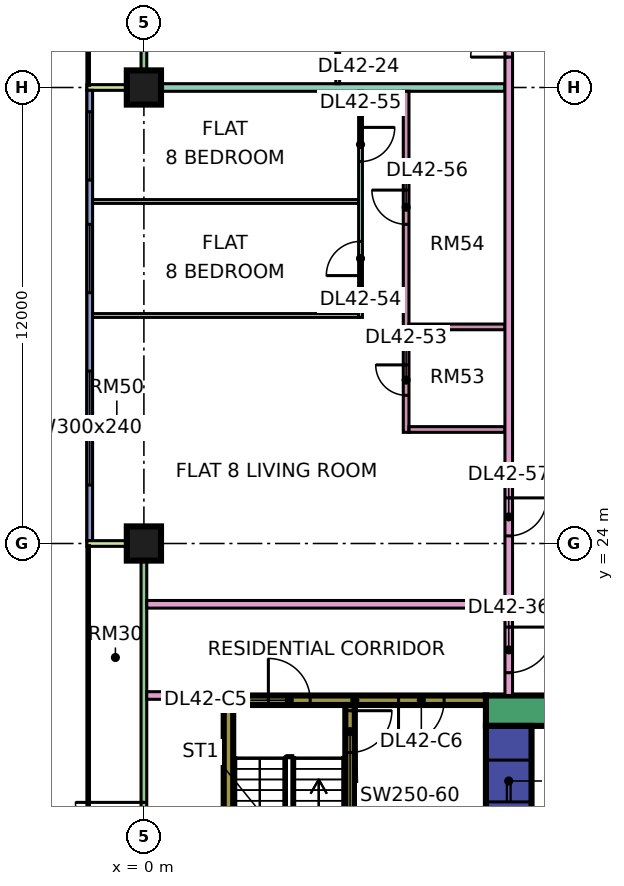
"""IFC4 building model, lengths in metres.
Left out: names, types, materials, properties, quantities, classifications, styles, units other than length and angle.
Written with IfcOpenShell. Run it as: python <this file> out.ifc"""

import sys

from ifc_helpers import new_model, si_unit, direction, frame, frame_2d, origin, origin_2d, place, context, subcontext, project, spatial, rectangle, extrude, element, fill, save


model = new_model("IFC4")
c1 = context("Model", 3, precision=1e-05, world=origin(), true_north=direction((0.0, 1.0)))
c2 = subcontext(c1, "Body", "Model", "MODEL_VIEW")
j1 = project(units=[si_unit("LENGTHUNIT", "METRE"), si_unit("PLANEANGLEUNIT", "RADIAN")], contexts=[c1])
p1 = place(None, origin())
s1 = spatial("IfcSite", under=j1, at=p1, CompositionType="ELEMENT")
p2 = place(p1, origin())
s2 = spatial("IfcBuilding", under=s1, at=p2, CompositionType="ELEMENT")
p3 = place(p2, frame((0.0, 0.0, 183.65)))
s3 = spatial("IfcBuildingStorey", under=s2, at=p3, CompositionType="ELEMENT", Elevation=183.65)
p4 = place(p3, frame((0.0, 24.0, 0.0), z_axis=(0.0, 0.0, 1.0), x_axis=(1.0, 0.0, 0.0)))
e1 = element("IfcColumn", 1, at=p4, inside=s3, PredefinedType="COLUMN", context=c2, shape_type="SweptSolid", body=[
    extrude(rectangle(XDim=0.9, YDim=0.9, at=origin_2d()), origin(), (0.0, 0.0, 1.0), 3.75),
])
p5 = place(p3, frame((0.0, 36.0, 0.0), z_axis=(0.0, 0.0, 1.0), x_axis=(1.0, 0.0, 0.0)))
e2 = element("IfcColumn", 2, at=p5, inside=s3, PredefinedType="COLUMN", context=c2, shape_type="SweptSolid", body=[
    extrude(rectangle(XDim=0.9, YDim=0.9, at=origin_2d()), origin(), (0.0, 0.0, 1.0), 3.75),
])
p6 = place(p3, frame((9.0, 19.6, 0.0), z_axis=(0.0, 0.0, 1.0), x_axis=(1.0, 0.0, 0.0)))
e3 = element("IfcWall", 3, at=p6, inside=s3, PredefinedType="SHEAR", context=c2, shape_type="SweptSolid", body=[
    extrude(rectangle(XDim=25.0, YDim=0.8, at=frame_2d((12.5, 0.0))), origin(), (0.0, 0.0, 1.0), 3.75),
])
p7 = place(p6, frame((19.1, 0.0, 0.0)))
e4 = element("IfcOpeningElement", 4, at=p7, cuts=e3, PredefinedType="OPENING", context=c2, shape_type="SweptSolid", body=[
    extrude(rectangle(XDim=1.8, YDim=2.4, at=frame_2d((0.9, 1.2))), frame((0.0, 0.41, 0.0), z_axis=(0.0, -1.0, 0.0), x_axis=(1.0, 0.0, 0.0)), (0.0, 0.0, 1.0), 0.82),
])
p8 = place(p3, frame((9.6, 7.8, 0.0), z_axis=(0.0, 0.0, 1.0), x_axis=(0.0, 1.0, 0.0)))
e5 = element("IfcWall", 5, at=p8, inside=s3, PredefinedType="SHEAR", context=c2, shape_type="SweptSolid", body=[
    extrude(rectangle(XDim=11.4, YDim=1.2, at=frame_2d((5.7, 0.0))), origin(), (0.0, 0.0, 1.0), 3.75),
])
p9 = place(p8, frame((4.075, 0.0, 0.0)))
e6 = element("IfcOpeningElement", 6, at=p9, cuts=e5, PredefinedType="OPENING", context=c2, shape_type="SweptSolid", body=[
    extrude(rectangle(XDim=1.1, YDim=2.2, at=frame_2d((0.55, 1.1))), frame((0.0, 0.61, 0.0), z_axis=(0.0, -1.0, 0.0), x_axis=(1.0, 0.0, 0.0)), (0.0, 0.0, 1.0), 1.22),
])
p10 = place(p8, frame((6.575, 0.0, 0.0)))
e7 = element("IfcOpeningElement", 7, at=p10, cuts=e5, PredefinedType="OPENING", context=c2, shape_type="SweptSolid", body=[
    extrude(rectangle(XDim=1.1, YDim=2.2, at=frame_2d((0.55, 1.1))), frame((0.0, 0.61, 0.0), z_axis=(0.0, -1.0, 0.0), x_axis=(1.0, 0.0, 0.0)), (0.0, 0.0, 1.0), 1.22),
])
p11 = place(p8, frame((9.4, 0.0, 0.0)))
e8 = element("IfcOpeningElement", 8, at=p11, cuts=e5, PredefinedType="OPENING", context=c2, shape_type="SweptSolid", body=[
    extrude(rectangle(XDim=1.1, YDim=2.2, at=frame_2d((0.55, 1.1))), frame((0.0, 0.61, 0.0), z_axis=(0.0, -1.0, 0.0), x_axis=(1.0, 0.0, 0.0)), (0.0, 0.0, 1.0), 1.22),
])
p12 = place(p8, frame((1.75, 0.0, 0.0)))
e9 = element("IfcOpeningElement", 9, at=p12, cuts=e5, PredefinedType="OPENING", context=c2, shape_type="SweptSolid", body=[
    extrude(rectangle(XDim=0.9, YDim=2.1, at=frame_2d((0.45, 1.05))), frame((0.0, 0.61, 0.0), z_axis=(0.0, -1.0, 0.0), x_axis=(1.0, 0.0, 0.0)), (0.0, 0.0, 1.0), 1.22),
])
p13 = place(p3, frame((2.1, 19.875, 0.0), z_axis=(0.0, 0.0, 1.0), x_axis=(1.0, 0.0, 0.0)))
e10 = element("IfcWall", 10, at=p13, inside=s3, PredefinedType="SHEAR", context=c2, shape_type="SweptSolid", body=[
    extrude(rectangle(XDim=6.9, YDim=0.25, at=frame_2d((3.45, 0.0))), origin(), (0.0, 0.0, 1.0), 3.75),
])
p14 = place(p13, frame((1.175, 0.0, 0.0)))
e11 = element("IfcOpeningElement", 11, at=p14, cuts=e10, PredefinedType="OPENING", context=c2, shape_type="SweptSolid", body=[
    extrude(rectangle(XDim=1.1, YDim=2.2, at=frame_2d((0.55, 1.1))), frame((0.0, 0.135, 0.0), z_axis=(0.0, -1.0, 0.0), x_axis=(1.0, 0.0, 0.0)), (0.0, 0.0, 1.0), 0.27),
])
p15 = place(p13, frame((4.6, 0.0, 0.0)))
e12 = element("IfcOpeningElement", 12, at=p15, cuts=e10, PredefinedType="OPENING", context=c2, shape_type="SweptSolid", body=[
    extrude(rectangle(XDim=1.2, YDim=2.2, at=frame_2d((0.6, 1.1))), frame((0.0, 0.135, 0.0), z_axis=(0.0, -1.0, 0.0), x_axis=(1.0, 0.0, 0.0)), (0.0, 0.0, 1.0), 0.27),
])
p16 = place(p3, frame((2.225, 13.25, 0.0), z_axis=(0.0, 0.0, 1.0), x_axis=(0.0, 1.0, 0.0)))
e13 = element("IfcWall", 13, at=p16, inside=s3, PredefinedType="SHEAR", context=c2, shape_type="SweptSolid", body=[
    extrude(rectangle(XDim=6.5, YDim=0.25, at=frame_2d((3.25, 0.0))), origin(), (0.0, 0.0, 1.0), 3.75),
])
p17 = place(p3, frame((5.425, 13.25, 0.0), z_axis=(0.0, 0.0, 1.0), x_axis=(0.0, 1.0, 0.0)))
e14 = element("IfcWall", 14, at=p17, inside=s3, PredefinedType="SHEAR", context=c2, shape_type="SweptSolid", body=[
    extrude(rectangle(XDim=6.5, YDim=0.25, at=frame_2d((3.25, 0.0))), origin(), (0.0, 0.0, 1.0), 3.75),
])
p18 = place(p17, frame((5.25, 0.0, 0.0)))
e15 = element("IfcOpeningElement", 15, at=p18, cuts=e14, PredefinedType="OPENING", context=c2, shape_type="SweptSolid", body=[
    extrude(rectangle(XDim=1.1, YDim=2.2, at=frame_2d((0.55, 1.1))), frame((0.0, 0.135, 0.0), z_axis=(0.0, -1.0, 0.0), x_axis=(1.0, 0.0, 0.0)), (0.0, 0.0, 1.0), 0.27),
])
p19 = place(p3, frame((0.0, 47.925, 0.0), z_axis=(0.0, 0.0, 1.0), x_axis=(0.0, -1.0, 0.0)))
e16 = element("IfcWall", 16, at=p19, inside=s3, PredefinedType="SOLIDWALL", context=c2, shape_type="SweptSolid", body=[
    extrude(rectangle(XDim=11.85, YDim=0.15, at=frame_2d((5.925, 0.0))), origin(), (0.0, 0.0, 1.0), 3.35),
])
p20 = place(p19, frame((0.587, 0.0, 0.45)))
e17 = element("IfcOpeningElement", 17, at=p20, cuts=e16, PredefinedType="OPENING", context=c2, shape_type="SweptSolid", body=[
    extrude(rectangle(XDim=1.2, YDim=2.4, at=frame_2d((0.6, 1.2))), frame((0.0, 0.085, 0.0), z_axis=(0.0, -1.0, 0.0), x_axis=(1.0, 0.0, 0.0)), (0.0, 0.0, 1.0), 0.17),
])
p21 = place(p19, frame((5.3, 0.0, 0.0)))
e18 = element("IfcOpeningElement", 18, at=p21, cuts=e16, PredefinedType="OPENING", context=c2, shape_type="SweptSolid", body=[
    extrude(rectangle(XDim=1.8, YDim=2.4, at=frame_2d((0.9, 1.2))), frame((0.0, 0.085, 0.0), z_axis=(0.0, -1.0, 0.0), x_axis=(1.0, 0.0, 0.0)), (0.0, 0.0, 1.0), 0.17),
])
p22 = place(p19, frame((9.55, 0.0, 0.45)))
e19 = element("IfcOpeningElement", 19, at=p22, cuts=e16, PredefinedType="OPENING", context=c2, shape_type="SweptSolid", body=[
    extrude(rectangle(XDim=1.2, YDim=2.4, at=frame_2d((0.6, 1.2))), frame((0.0, 0.085, 0.0), z_axis=(0.0, -1.0, 0.0), x_axis=(1.0, 0.0, 0.0)), (0.0, 0.0, 1.0), 0.17),
])
p23 = place(p3, frame((-1.5, 36.0, 0.0), z_axis=(0.0, 0.0, 1.0), x_axis=(1.0, 0.0, 0.0)))
e20 = element("IfcWall", 20, at=p23, inside=s3, PredefinedType="SOLIDWALL", context=c2, shape_type="SweptSolid", body=[
    extrude(rectangle(XDim=1.5, YDim=0.15, at=frame_2d((0.75, 0.0))), origin(), (0.0, 0.0, 1.0), 3.35),
])
p24 = place(p3, frame((-1.425, 35.925, 0.0), z_axis=(0.0, 0.0, 1.0), x_axis=(0.0, -1.0, 0.0)))
e21 = element("IfcWall", 21, at=p24, inside=s3, PredefinedType="SOLIDWALL", context=c2, shape_type="SweptSolid", body=[
    extrude(rectangle(XDim=11.85, YDim=0.15, at=frame_2d((5.925, 0.0))), origin(), (0.0, 0.0, 1.0), 3.35),
])
p25 = place(p24, frame((0.562, 0.0, 0.45)))
e22 = element("IfcOpeningElement", 22, at=p25, cuts=e21, PredefinedType="OPENING", context=c2, shape_type="SweptSolid", body=[
    extrude(rectangle(XDim=1.8, YDim=2.4, at=frame_2d((0.9, 1.2))), frame((0.0, 0.085, 0.0), z_axis=(0.0, -1.0, 0.0), x_axis=(1.0, 0.0, 0.0)), (0.0, 0.0, 1.0), 0.17),
])
p26 = place(p24, frame((3.525, 0.0, 0.45)))
e23 = element("IfcOpeningElement", 23, at=p26, cuts=e21, PredefinedType="OPENING", context=c2, shape_type="SweptSolid", body=[
    extrude(rectangle(XDim=1.8, YDim=2.4, at=frame_2d((0.9, 1.2))), frame((0.0, 0.085, 0.0), z_axis=(0.0, -1.0, 0.0), x_axis=(1.0, 0.0, 0.0)), (0.0, 0.0, 1.0), 0.17),
])
p27 = place(p24, frame((7.387, 0.0, 0.45)))
e24 = element("IfcOpeningElement", 24, at=p27, cuts=e21, PredefinedType="OPENING", context=c2, shape_type="SweptSolid", body=[
    extrude(rectangle(XDim=3.0, YDim=2.4, at=frame_2d((1.5, 1.2))), frame((0.0, 0.085, 0.0), z_axis=(0.0, -1.0, 0.0), x_axis=(1.0, 0.0, 0.0)), (0.0, 0.0, 1.0), 0.17),
])
p28 = place(p3, frame((0.0, 23.925, 0.0), z_axis=(0.0, 0.0, 1.0), x_axis=(0.0, -1.0, 0.0)))
e25 = element("IfcWall", 25, at=p28, inside=s3, PredefinedType="SOLIDWALL", context=c2, shape_type="SweptSolid", body=[
    extrude(rectangle(XDim=11.35, YDim=0.15, at=frame_2d((5.675, 0.0))), origin(), (0.0, 0.0, 1.0), 3.35),
])
p29 = place(p28, frame((6.738, 0.0, 0.0)))
e26 = element("IfcOpeningElement", 26, at=p29, cuts=e25, PredefinedType="OPENING", context=c2, shape_type="SweptSolid", body=[
    extrude(rectangle(XDim=1.8, YDim=2.4, at=frame_2d((0.9, 1.2))), frame((0.0, 0.085, 0.0), z_axis=(0.0, -1.0, 0.0), x_axis=(1.0, 0.0, 0.0)), (0.0, 0.0, 1.0), 0.17),
])
p30 = place(p3, frame((-1.5, 24.0, 0.0), z_axis=(0.0, 0.0, 1.0), x_axis=(1.0, 0.0, 0.0)))
e27 = element("IfcWall", 27, at=p30, inside=s3, PredefinedType="SOLIDWALL", context=c2, shape_type="SweptSolid", body=[
    extrude(rectangle(XDim=1.5, YDim=0.15, at=frame_2d((0.75, 0.0))), origin(), (0.0, 0.0, 1.0), 3.35),
])
p31 = place(p3, frame((-1.351, 33.0, 0.0), z_axis=(0.0, 0.0, 1.0), x_axis=(1.0, 0.0, 0.0)))
e28 = element("IfcWall", 28, at=p31, inside=s3, PredefinedType="PARTITIONING", context=c2, shape_type="SweptSolid", body=[
    extrude(rectangle(XDim=7.001, YDim=0.1, at=frame_2d((3.5, 0.0))), origin(), (0.0, 0.0, 1.0), 3.35),
])
p32 = place(p3, frame((-1.35, 30.0, 0.0), z_axis=(0.0, 0.0, 1.0), x_axis=(1.0, 0.0, 0.0)))
e29 = element("IfcWall", 29, at=p32, inside=s3, PredefinedType="PARTITIONING", context=c2, shape_type="SweptSolid", body=[
    extrude(rectangle(XDim=7.0, YDim=0.1, at=frame_2d((3.5, 0.0))), origin(), (0.0, 0.0, 1.0), 3.35),
])
e30 = element("IfcWall", 30, at=p5, inside=s3, PredefinedType="PARTITIONING", context=c2, shape_type="SweptSolid", body=[
    extrude(rectangle(XDim=9.5, YDim=0.2, at=frame_2d((4.75, 0.0))), origin(), (0.0, 0.0, 1.0), 3.35),
])
p33 = place(p3, frame((0.074, 20.0, 0.0), z_axis=(0.0, 0.0, 1.0), x_axis=(1.0, 0.0, 0.0)))
e31 = element("IfcWall", 31, at=p33, inside=s3, PredefinedType="PARTITIONING", context=c2, shape_type="SweptSolid", body=[
    extrude(rectangle(XDim=2.026, YDim=0.2, at=frame_2d((1.013, 0.0))), origin(), (0.0, 0.0, 1.0), 3.35),
])
p34 = place(p3, frame((0.074, 22.4, 0.0), z_axis=(0.0, 0.0, 1.0), x_axis=(1.0, 0.0, 0.0)))
e32 = element("IfcWall", 32, at=p34, inside=s3, PredefinedType="PARTITIONING", context=c2, shape_type="SweptSolid", body=[
    extrude(rectangle(XDim=9.426, YDim=0.2, at=frame_2d((4.713, 0.0))), origin(), (0.0, 0.0, 1.0), 3.35),
])
p35 = place(p3, frame((5.1, 36.1, 0.0), z_axis=(0.0, 0.0, 1.0), x_axis=(0.0, 1.0, 0.0)))
e33 = element("IfcWall", 33, at=p35, inside=s3, PredefinedType="PARTITIONING", context=c2, shape_type="SweptSolid", body=[
    extrude(rectangle(XDim=2.85, YDim=0.1, at=frame_2d((1.425, 0.0))), origin(), (0.0, 0.0, 1.0), 3.35),
])
p36 = place(p35, frame((0.95, 0.0, 0.0)))
e34 = element("IfcOpeningElement", 34, at=p36, cuts=e33, PredefinedType="OPENING", context=c2, shape_type="SweptSolid", body=[
    extrude(rectangle(XDim=0.9, YDim=2.1, at=frame_2d((0.45, 1.05))), frame((0.0, 0.06, 0.0), z_axis=(0.0, -1.0, 0.0), x_axis=(1.0, 0.0, 0.0)), (0.0, 0.0, 1.0), 0.12),
])
p37 = place(p3, frame((5.7, 29.95, 0.0), z_axis=(0.0, 0.0, 1.0), x_axis=(0.0, 1.0, 0.0)))
e35 = element("IfcWall", 35, at=p37, inside=s3, PredefinedType="PARTITIONING", context=c2, shape_type="SweptSolid", body=[
    extrude(rectangle(XDim=5.95, YDim=0.1, at=frame_2d((2.975, 0.0))), origin(), (0.0, 0.0, 1.0), 3.35),
])
p38 = place(p37, frame((1.1, 0.0, 0.0)))
e36 = element("IfcOpeningElement", 36, at=p38, cuts=e35, PredefinedType="OPENING", context=c2, shape_type="SweptSolid", body=[
    extrude(rectangle(XDim=0.9, YDim=2.1, at=frame_2d((0.45, 1.05))), frame((0.0, 0.06, 0.0), z_axis=(0.0, -1.0, 0.0), x_axis=(1.0, 0.0, 0.0)), (0.0, 0.0, 1.0), 0.12),
])
p39 = place(p37, frame((4.1, 0.0, 0.0)))
e37 = element("IfcOpeningElement", 37, at=p39, cuts=e35, PredefinedType="OPENING", context=c2, shape_type="SweptSolid", body=[
    extrude(rectangle(XDim=0.9, YDim=2.1, at=frame_2d((0.45, 1.05))), frame((0.0, 0.06, 0.0), z_axis=(0.0, -1.0, 0.0), x_axis=(1.0, 0.0, 0.0)), (0.0, 0.0, 1.0), 0.12),
])
p40 = place(p3, frame((6.9, 26.925, 0.0), z_axis=(0.0, 0.0, 1.0), x_axis=(0.0, 1.0, 0.0)))
e38 = element("IfcWall", 38, at=p40, inside=s3, PredefinedType="PARTITIONING", context=c2, shape_type="SweptSolid", body=[
    extrude(rectangle(XDim=8.975, YDim=0.15, at=frame_2d((4.487, 0.0))), origin(), (0.0, 0.0, 1.0), 3.35),
])
p41 = place(p40, frame((0.975, 0.0, 0.0)))
e39 = element("IfcOpeningElement", 39, at=p41, cuts=e38, PredefinedType="OPENING", context=c2, shape_type="SweptSolid", body=[
    extrude(rectangle(XDim=0.8, YDim=2.1, at=frame_2d((0.4, 1.05))), frame((0.0, 0.085, 0.0), z_axis=(0.0, -1.0, 0.0), x_axis=(1.0, 0.0, 0.0)), (0.0, 0.0, 1.0), 0.17),
])
p42 = place(p40, frame((5.475, 0.0, 0.0)))
e40 = element("IfcOpeningElement", 40, at=p42, cuts=e38, PredefinedType="OPENING", context=c2, shape_type="SweptSolid", body=[
    extrude(rectangle(XDim=0.9, YDim=2.1, at=frame_2d((0.45, 1.05))), frame((0.0, 0.085, 0.0), z_axis=(0.0, -1.0, 0.0), x_axis=(1.0, 0.0, 0.0)), (0.0, 0.0, 1.0), 0.17),
])
for number, where, z_axis, x_axis in (
    (41, (6.975, 27.0, 0.0), (0.0, 0.0, 1.0), (1.0, 0.0, 0.0)),
    (42, (6.975, 29.7, 0.0), (0.0, 0.0, 1.0), (1.0, 0.0, 0.0)),
):
    element("IfcWall", number, at=place(p3, frame(where, z_axis=z_axis, x_axis=x_axis)), inside=s3, PredefinedType="PARTITIONING", context=c2, shape_type="SweptSolid", body=[
        extrude(rectangle(XDim=2.525, YDim=0.15, at=frame_2d((1.262, 0.0))), origin(), (0.0, 0.0, 1.0), 3.35),
    ])
p43 = place(p3, frame((9.6, 20.0, 0.0), z_axis=(0.0, 0.0, 1.0), x_axis=(0.0, 1.0, 0.0)))
e43 = element("IfcWall", 43, at=p43, inside=s3, PredefinedType="PARTITIONING", context=c2, shape_type="SweptSolid", body=[
    extrude(rectangle(XDim=44.35, YDim=0.2, at=frame_2d((22.175, 0.0))), origin(), (0.0, 0.0, 1.0), 3.35),
])
p44 = place(p43, frame((16.8, 0.0, 0.0)))
e44 = element("IfcOpeningElement", 44, at=p44, cuts=e43, PredefinedType="OPENING", context=c2, shape_type="SweptSolid", body=[
    extrude(rectangle(XDim=1.0, YDim=2.1, at=frame_2d((0.5, 1.05))), frame((0.0, 0.11, 0.0), z_axis=(0.0, -1.0, 0.0), x_axis=(1.0, 0.0, 0.0)), (0.0, 0.0, 1.0), 0.22),
])
p45 = place(p43, frame((40.65, 0.0, 0.0)))
e45 = element("IfcOpeningElement", 45, at=p45, cuts=e43, PredefinedType="OPENING", context=c2, shape_type="SweptSolid", body=[
    extrude(rectangle(XDim=1.0, YDim=2.1, at=frame_2d((0.5, 1.05))), frame((0.0, 0.11, 0.0), z_axis=(0.0, -1.0, 0.0), x_axis=(1.0, 0.0, 0.0)), (0.0, 0.0, 1.0), 0.22),
])
p46 = place(p43, frame((0.6, 0.0, 0.0)))
e46 = element("IfcOpeningElement", 46, at=p46, cuts=e43, PredefinedType="OPENING", context=c2, shape_type="SweptSolid", body=[
    extrude(rectangle(XDim=1.2, YDim=2.1, at=frame_2d((0.6, 1.05))), frame((0.0, 0.11, 0.0), z_axis=(0.0, -1.0, 0.0), x_axis=(1.0, 0.0, 0.0)), (0.0, 0.0, 1.0), 0.22),
])
p47 = place(p43, frame((4.2, 0.0, 0.0)))
e47 = element("IfcOpeningElement", 47, at=p47, cuts=e43, PredefinedType="OPENING", context=c2, shape_type="SweptSolid", body=[
    extrude(rectangle(XDim=1.0, YDim=2.1, at=frame_2d((0.5, 1.05))), frame((0.0, 0.11, 0.0), z_axis=(0.0, -1.0, 0.0), x_axis=(1.0, 0.0, 0.0)), (0.0, 0.0, 1.0), 0.22),
])
p48 = place(p25, origin())
e48 = element("IfcWindow", 48, at=p48, inside=s3, PartitioningType="SINGLE_PANEL", PredefinedType="WINDOW", context=c2, shape_type="SweptSolid", body=[
    extrude(rectangle(XDim=1.8, YDim=2.4, at=frame_2d((0.9, 1.2))), frame((0.0, 0.03, 0.0), z_axis=(0.0, -1.0, 0.0), x_axis=(1.0, 0.0, 0.0)), (0.0, 0.0, 1.0), 0.06),
])
fill(e22, e48)
p49 = place(p26, origin())
e49 = element("IfcWindow", 49, at=p49, inside=s3, PartitioningType="SINGLE_PANEL", PredefinedType="WINDOW", context=c2, shape_type="SweptSolid", body=[
    extrude(rectangle(XDim=1.8, YDim=2.4, at=frame_2d((0.9, 1.2))), frame((0.0, 0.03, 0.0), z_axis=(0.0, -1.0, 0.0), x_axis=(1.0, 0.0, 0.0)), (0.0, 0.0, 1.0), 0.06),
])
fill(e23, e49)
p50 = place(p27, origin())
e50 = element("IfcWindow", 50, at=p50, inside=s3, PartitioningType="SINGLE_PANEL", PredefinedType="WINDOW", context=c2, shape_type="SweptSolid", body=[
    extrude(rectangle(XDim=3.0, YDim=2.4, at=frame_2d((1.5, 1.2))), frame((0.0, 0.03, 0.0), z_axis=(0.0, -1.0, 0.0), x_axis=(1.0, 0.0, 0.0)), (0.0, 0.0, 1.0), 0.06),
])
fill(e24, e50)
p51 = place(p29, frame((1.8, 0.0, 0.0), z_axis=(0.0, 0.0, 1.0), x_axis=(-1.0, 0.0, 0.0)))
e51 = element("IfcDoor", 51, at=p51, inside=s3, OperationType="DOUBLE_DOOR_SINGLE_SWING", PredefinedType="DOOR", context=c2, shape_type="SweptSolid", body=[
    extrude(rectangle(XDim=1.8, YDim=2.4, at=frame_2d((0.9, 1.2))), frame((0.0, 0.025, 0.0), z_axis=(0.0, -1.0, 0.0), x_axis=(1.0, 0.0, 0.0)), (0.0, 0.0, 1.0), 0.05),
])
fill(e26, e51)
p52 = place(p11, origin())
e52 = element("IfcDoor", 52, at=p52, inside=s3, OperationType="DOUBLE_DOOR_SLIDING", PredefinedType="DOOR", context=c2, shape_type="SweptSolid", body=[
    extrude(rectangle(XDim=1.1, YDim=2.2, at=frame_2d((0.55, 1.1))), frame((0.0, 0.025, 0.0), z_axis=(0.0, -1.0, 0.0), x_axis=(1.0, 0.0, 0.0)), (0.0, 0.0, 1.0), 0.05),
])
fill(e8, e52)
p53 = place(p18, origin())
e53 = element("IfcDoor", 53, at=p53, inside=s3, OperationType="SINGLE_SWING_RIGHT", PredefinedType="DOOR", context=c2, shape_type="SweptSolid", body=[
    extrude(rectangle(XDim=1.1, YDim=2.2, at=frame_2d((0.55, 1.1))), frame((0.0, 0.025, 0.0), z_axis=(0.0, -1.0, 0.0), x_axis=(1.0, 0.0, 0.0)), (0.0, 0.0, 1.0), 0.05),
])
fill(e15, e53)
p54 = place(p14, origin())
e54 = element("IfcDoor", 54, at=p54, inside=s3, OperationType="SINGLE_SWING_LEFT", PredefinedType="DOOR", context=c2, shape_type="SweptSolid", body=[
    extrude(rectangle(XDim=1.1, YDim=2.2, at=frame_2d((0.55, 1.1))), frame((0.0, 0.025, 0.0), z_axis=(0.0, -1.0, 0.0), x_axis=(1.0, 0.0, 0.0)), (0.0, 0.0, 1.0), 0.05),
])
fill(e11, e54)
p55 = place(p15, frame((1.2, 0.0, 0.0), z_axis=(0.0, 0.0, 1.0), x_axis=(-1.0, 0.0, 0.0)))
e55 = element("IfcDoor", 55, at=p55, inside=s3, OperationType="SINGLE_SWING_LEFT", PredefinedType="DOOR", context=c2, shape_type="SweptSolid", body=[
    extrude(rectangle(XDim=1.2, YDim=2.2, at=frame_2d((0.6, 1.1))), frame((0.0, 0.025, 0.0), z_axis=(0.0, -1.0, 0.0), x_axis=(1.0, 0.0, 0.0)), (0.0, 0.0, 1.0), 0.05),
])
fill(e12, e55)
p56 = place(p44, origin())
e56 = element("IfcDoor", 56, at=p56, inside=s3, OperationType="SINGLE_SWING_LEFT", PredefinedType="DOOR", context=c2, shape_type="SweptSolid", body=[
    extrude(rectangle(XDim=1.0, YDim=2.1, at=frame_2d((0.5, 1.05))), frame((0.0, 0.025, 0.0), z_axis=(0.0, -1.0, 0.0), x_axis=(1.0, 0.0, 0.0)), (0.0, 0.0, 1.0), 0.05),
])
fill(e44, e56)
p57 = place(p46, origin())
e57 = element("IfcDoor", 57, at=p57, inside=s3, OperationType="SINGLE_SWING_RIGHT", PredefinedType="DOOR", context=c2, shape_type="SweptSolid", body=[
    extrude(rectangle(XDim=1.2, YDim=2.1, at=frame_2d((0.6, 1.05))), frame((0.0, 0.025, 0.0), z_axis=(0.0, -1.0, 0.0), x_axis=(1.0, 0.0, 0.0)), (0.0, 0.0, 1.0), 0.05),
])
fill(e46, e57)
p58 = place(p41, frame((0.8, 0.0, 0.0), z_axis=(0.0, 0.0, 1.0), x_axis=(-1.0, 0.0, 0.0)))
e58 = element("IfcDoor", 58, at=p58, inside=s3, OperationType="SINGLE_SWING_RIGHT", PredefinedType="DOOR", context=c2, shape_type="SweptSolid", body=[
    extrude(rectangle(XDim=0.8, YDim=2.1, at=frame_2d((0.4, 1.05))), frame((0.0, 0.025, 0.0), z_axis=(0.0, -1.0, 0.0), x_axis=(1.0, 0.0, 0.0)), (0.0, 0.0, 1.0), 0.05),
])
fill(e39, e58)
p59 = place(p38, origin())
e59 = element("IfcDoor", 59, at=p59, inside=s3, OperationType="SINGLE_SWING_LEFT", PredefinedType="DOOR", context=c2, shape_type="SweptSolid", body=[
    extrude(rectangle(XDim=0.9, YDim=2.1, at=frame_2d((0.45, 1.05))), frame((0.0, 0.025, 0.0), z_axis=(0.0, -1.0, 0.0), x_axis=(1.0, 0.0, 0.0)), (0.0, 0.0, 1.0), 0.05),
])
fill(e36, e59)
p60 = place(p39, origin())
e60 = element("IfcDoor", 60, at=p60, inside=s3, OperationType="SINGLE_SWING_RIGHT", PredefinedType="DOOR", context=c2, shape_type="SweptSolid", body=[
    extrude(rectangle(XDim=0.9, YDim=2.1, at=frame_2d((0.45, 1.05))), frame((0.0, 0.025, 0.0), z_axis=(0.0, -1.0, 0.0), x_axis=(1.0, 0.0, 0.0)), (0.0, 0.0, 1.0), 0.05),
])
fill(e37, e60)
p61 = place(p42, frame((0.9, 0.0, 0.0), z_axis=(0.0, 0.0, 1.0), x_axis=(-1.0, 0.0, 0.0)))
e61 = element("IfcDoor", 61, at=p61, inside=s3, OperationType="SINGLE_SWING_RIGHT", PredefinedType="DOOR", context=c2, shape_type="SweptSolid", body=[
    extrude(rectangle(XDim=0.9, YDim=2.1, at=frame_2d((0.45, 1.05))), frame((0.0, 0.025, 0.0), z_axis=(0.0, -1.0, 0.0), x_axis=(1.0, 0.0, 0.0)), (0.0, 0.0, 1.0), 0.05),
])
fill(e40, e61)
p62 = place(p47, origin())
e62 = element("IfcDoor", 62, at=p62, inside=s3, OperationType="SINGLE_SWING_RIGHT", PredefinedType="DOOR", context=c2, shape_type="SweptSolid", body=[
    extrude(rectangle(XDim=1.0, YDim=2.1, at=frame_2d((0.5, 1.05))), frame((0.0, 0.025, 0.0), z_axis=(0.0, -1.0, 0.0), x_axis=(1.0, 0.0, 0.0)), (0.0, 0.0, 1.0), 0.05),
])
fill(e47, e62)
save(model, sys.argv[1])
